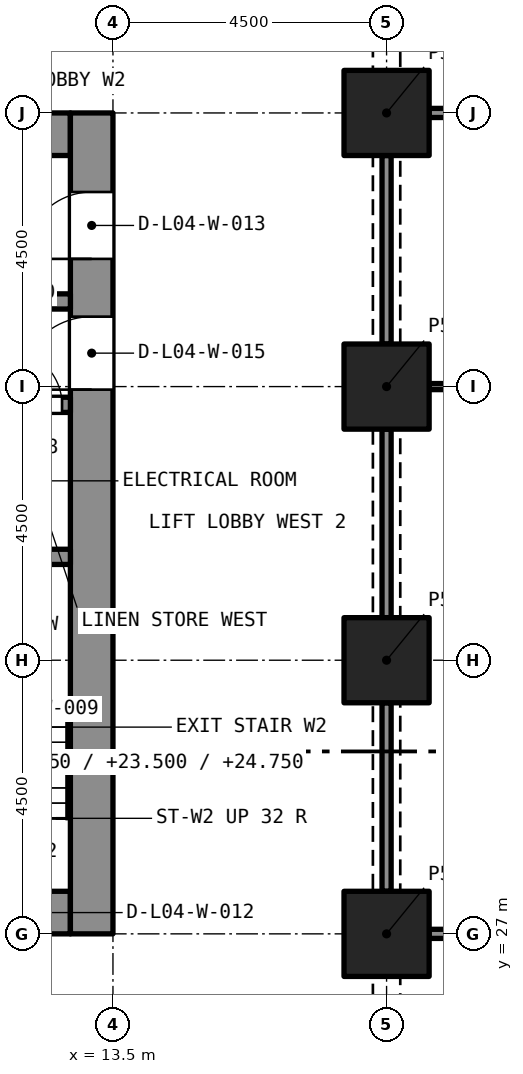
"""IFC4 building model, lengths in metres.
Left out: names, types, materials, properties, quantities, classifications, styles, units other than length and angle.
Written with IfcOpenShell. Run it as: python <this file> out.ifc"""

import sys

from ifc_helpers import new_model, si_unit, direction, frame, frame_2d, origin, origin_2d, place, context, subcontext, project, spatial, rectangle, extrude, element, fill, save


model = new_model("IFC4")
c1 = context("Model", 3, precision=1e-05, world=origin(), true_north=direction((0.0, 1.0)))
c2 = subcontext(c1, "Body", "Model", "MODEL_VIEW")
j1 = project(units=[si_unit("LENGTHUNIT", "METRE"), si_unit("PLANEANGLEUNIT", "RADIAN")], contexts=[c1])
p1 = place(None, origin())
s1 = spatial("IfcSite", under=j1, at=p1, CompositionType="ELEMENT")
p2 = place(p1, origin())
s2 = spatial("IfcBuilding", under=s1, at=p2, CompositionType="ELEMENT")
p3 = place(p2, frame((0.0, 0.0, 21.0)))
s3 = spatial("IfcBuildingStorey", under=s2, at=p3, CompositionType="ELEMENT", Elevation=21.0)
for number, where, z_axis, x_axis in (
    (1, (18.0, 27.0, 0.0), (0.0, 0.0, 1.0), (1.0, 0.0, 0.0)),
    (2, (18.0, 31.5, 0.0), (0.0, 0.0, 1.0), (1.0, 0.0, 0.0)),
    (3, (18.0, 36.0, 0.0), (0.0, 0.0, 1.0), (1.0, 0.0, 0.0)),
    (4, (18.0, 40.5, 0.0), (0.0, 0.0, 1.0), (1.0, 0.0, 0.0)),
):
    element("IfcColumn", number, at=place(p3, frame(where, z_axis=z_axis, x_axis=x_axis)), inside=s3, PredefinedType="COLUMN", context=c2, shape_type="SweptSolid", body=[
        extrude(rectangle(XDim=1.4, YDim=1.4, at=origin_2d()), origin(), (0.0, 0.0, 1.0), 5.0),
    ])
p4 = place(p3, frame((5.2, 27.35, 0.0), z_axis=(0.0, 0.0, 1.0), x_axis=(1.0, 0.0, 0.0)))
e5 = element("IfcWall", 5, at=p4, inside=s3, PredefinedType="SOLIDWALL", context=c2, shape_type="SweptSolid", body=[
    extrude(rectangle(XDim=7.6, YDim=0.7, at=frame_2d((3.8, 0.0))), origin(), (0.0, 0.0, 1.0), 5.0),
])
p5 = place(p4, frame((0.725, 0.0, 0.0)))
e6 = element("IfcOpeningElement", 6, at=p5, cuts=e5, PredefinedType="OPENING", context=c2, shape_type="SweptSolid", body=[
    extrude(rectangle(XDim=1.1, YDim=2.1, at=frame_2d((0.55, 1.05))), frame((0.0, 0.36, 0.0), z_axis=(0.0, -1.0, 0.0), x_axis=(1.0, 0.0, 0.0)), (0.0, 0.0, 1.0), 0.72),
])
p6 = place(p4, frame((3.25, 0.0, 0.0)))
e7 = element("IfcOpeningElement", 7, at=p6, cuts=e5, PredefinedType="OPENING", context=c2, shape_type="SweptSolid", body=[
    extrude(rectangle(XDim=1.1, YDim=2.1, at=frame_2d((0.55, 1.05))), frame((0.0, 0.36, 0.0), z_axis=(0.0, -1.0, 0.0), x_axis=(1.0, 0.0, 0.0)), (0.0, 0.0, 1.0), 0.72),
])
p7 = place(p4, frame((5.775, 0.0, 0.0)))
e8 = element("IfcOpeningElement", 8, at=p7, cuts=e5, PredefinedType="OPENING", context=c2, shape_type="SweptSolid", body=[
    extrude(rectangle(XDim=1.1, YDim=2.1, at=frame_2d((0.55, 1.05))), frame((0.0, 0.36, 0.0), z_axis=(0.0, -1.0, 0.0), x_axis=(1.0, 0.0, 0.0)), (0.0, 0.0, 1.0), 0.72),
])
p8 = place(p3, frame((5.2, 40.15, 0.0), z_axis=(0.0, 0.0, 1.0), x_axis=(1.0, 0.0, 0.0)))
e9 = element("IfcWall", 9, at=p8, inside=s3, PredefinedType="SOLIDWALL", context=c2, shape_type="SweptSolid", body=[
    extrude(rectangle(XDim=7.6, YDim=0.7, at=frame_2d((3.8, 0.0))), origin(), (0.0, 0.0, 1.0), 5.0),
])
p9 = place(p3, frame((13.15, 27.0, 0.0), z_axis=(0.0, 0.0, 1.0), x_axis=(0.0, 1.0, 0.0)))
e10 = element("IfcWall", 10, at=p9, inside=s3, PredefinedType="SOLIDWALL", context=c2, shape_type="SweptSolid", body=[
    extrude(rectangle(XDim=13.5, YDim=0.7, at=frame_2d((6.75, 0.0))), origin(), (0.0, 0.0, 1.0), 5.0),
])
p10 = place(p9, frame((11.1, 0.0, 0.0)))
e11 = element("IfcOpeningElement", 11, at=p10, cuts=e10, PredefinedType="OPENING", context=c2, shape_type="SweptSolid", body=[
    extrude(rectangle(XDim=1.1, YDim=2.1, at=frame_2d((0.55, 1.05))), frame((0.0, 0.36, 0.0), z_axis=(0.0, -1.0, 0.0), x_axis=(1.0, 0.0, 0.0)), (0.0, 0.0, 1.0), 0.72),
])
p11 = place(p9, frame((8.95, 0.0, 0.0)))
e12 = element("IfcOpeningElement", 12, at=p11, cuts=e10, PredefinedType="OPENING", context=c2, shape_type="SweptSolid", body=[
    extrude(rectangle(XDim=1.2, YDim=2.1, at=frame_2d((0.6, 1.05))), frame((0.0, 0.36, 0.0), z_axis=(0.0, -1.0, 0.0), x_axis=(1.0, 0.0, 0.0)), (0.0, 0.0, 1.0), 0.72),
])
p12 = place(p3, frame((5.2, 33.2, 0.0), z_axis=(0.0, 0.0, 1.0), x_axis=(1.0, 0.0, 0.0)))
e13 = element("IfcWall", 13, at=p12, inside=s3, PredefinedType="SOLIDWALL", context=c2, shape_type="SweptSolid", body=[
    extrude(rectangle(XDim=7.6, YDim=0.25, at=frame_2d((3.8, 0.0))), origin(), (0.0, 0.0, 1.0), 4.65),
])
p13 = place(p12, frame((3.3, 0.0, 0.0)))
e14 = element("IfcOpeningElement", 14, at=p13, cuts=e13, PredefinedType="OPENING", context=c2, shape_type="SweptSolid", body=[
    extrude(rectangle(XDim=1.0, YDim=2.1, at=frame_2d((0.5, 1.05))), frame((0.0, 0.135, 0.0), z_axis=(0.0, -1.0, 0.0), x_axis=(1.0, 0.0, 0.0)), (0.0, 0.0, 1.0), 0.27),
])
p14 = place(p3, frame((5.2, 35.7, 0.0), z_axis=(0.0, 0.0, 1.0), x_axis=(1.0, 0.0, 0.0)))
e15 = element("IfcWall", 15, at=p14, inside=s3, PredefinedType="SOLIDWALL", context=c2, shape_type="SweptSolid", body=[
    extrude(rectangle(XDim=7.6, YDim=0.25, at=frame_2d((3.8, 0.0))), origin(), (0.0, 0.0, 1.0), 4.65),
])
p15 = place(p14, frame((0.137, 0.0, 0.0)))
e16 = element("IfcOpeningElement", 16, at=p15, cuts=e15, PredefinedType="OPENING", context=c2, shape_type="SweptSolid", body=[
    extrude(rectangle(XDim=0.9, YDim=2.1, at=frame_2d((0.45, 1.05))), frame((0.0, 0.135, 0.0), z_axis=(0.0, -1.0, 0.0), x_axis=(1.0, 0.0, 0.0)), (0.0, 0.0, 1.0), 0.27),
])
p16 = place(p14, frame((1.512, 0.0, 0.0)))
e17 = element("IfcOpeningElement", 17, at=p16, cuts=e15, PredefinedType="OPENING", context=c2, shape_type="SweptSolid", body=[
    extrude(rectangle(XDim=0.9, YDim=2.1, at=frame_2d((0.45, 1.05))), frame((0.0, 0.135, 0.0), z_axis=(0.0, -1.0, 0.0), x_axis=(1.0, 0.0, 0.0)), (0.0, 0.0, 1.0), 0.27),
])
p17 = place(p14, frame((5.188, 0.0, 0.0)))
e18 = element("IfcOpeningElement", 18, at=p17, cuts=e15, PredefinedType="OPENING", context=c2, shape_type="SweptSolid", body=[
    extrude(rectangle(XDim=0.9, YDim=2.1, at=frame_2d((0.45, 1.05))), frame((0.0, 0.135, 0.0), z_axis=(0.0, -1.0, 0.0), x_axis=(1.0, 0.0, 0.0)), (0.0, 0.0, 1.0), 0.27),
])
p18 = place(p14, frame((6.562, 0.0, 0.0)))
e19 = element("IfcOpeningElement", 19, at=p18, cuts=e15, PredefinedType="OPENING", context=c2, shape_type="SweptSolid", body=[
    extrude(rectangle(XDim=0.9, YDim=2.1, at=frame_2d((0.45, 1.05))), frame((0.0, 0.135, 0.0), z_axis=(0.0, -1.0, 0.0), x_axis=(1.0, 0.0, 0.0)), (0.0, 0.0, 1.0), 0.27),
])
p19 = place(p3, frame((5.2, 37.4, 0.0), z_axis=(0.0, 0.0, 1.0), x_axis=(1.0, 0.0, 0.0)))
e20 = element("IfcWall", 20, at=p19, inside=s3, PredefinedType="SOLIDWALL", context=c2, shape_type="SweptSolid", body=[
    extrude(rectangle(XDim=7.6, YDim=0.25, at=frame_2d((3.8, 0.0))), origin(), (0.0, 0.0, 1.0), 4.65),
])
p20 = place(p19, frame((0.7, 0.0, 0.0)))
e21 = element("IfcOpeningElement", 21, at=p20, cuts=e20, PredefinedType="OPENING", context=c2, shape_type="SweptSolid", body=[
    extrude(rectangle(XDim=1.1, YDim=2.4, at=frame_2d((0.55, 1.2))), frame((0.0, 0.135, 0.0), z_axis=(0.0, -1.0, 0.0), x_axis=(1.0, 0.0, 0.0)), (0.0, 0.0, 1.0), 0.27),
])
p21 = place(p3, frame((18.7, 27.0, 0.0), z_axis=(0.0, 0.0, 1.0), x_axis=(1.0, 0.0, 0.0)))
e22 = element("IfcWall", 22, at=p21, inside=s3, PredefinedType="PARTITIONING", context=c2, shape_type="SweptSolid", body=[
    extrude(rectangle(XDim=12.1, YDim=0.15, at=frame_2d((6.05, 0.0))), origin(), (0.0, 0.0, 1.0), 4.55),
])
p22 = place(p21, frame((5.45, 0.0, 0.0)))
e23 = element("IfcOpeningElement", 23, at=p22, cuts=e22, PredefinedType="OPENING", context=c2, shape_type="SweptSolid", body=[
    extrude(rectangle(XDim=1.2, YDim=2.1, at=frame_2d((0.6, 1.05))), frame((0.0, 0.085, 0.0), z_axis=(0.0, -1.0, 0.0), x_axis=(1.0, 0.0, 0.0)), (0.0, 0.0, 1.0), 0.17),
])
p23 = place(p3, frame((18.7, 36.0, 0.0), z_axis=(0.0, 0.0, 1.0), x_axis=(1.0, 0.0, 0.0)))
e24 = element("IfcWall", 24, at=p23, inside=s3, PredefinedType="PARTITIONING", context=c2, shape_type="SweptSolid", body=[
    extrude(rectangle(XDim=12.1, YDim=0.1, at=frame_2d((6.05, 0.0))), origin(), (0.0, 0.0, 1.0), 4.55),
])
for number, where, z_axis, x_axis in (
    (25, (18.0, 27.7, 0.0), (0.0, 0.0, 1.0), (0.0, 1.0, 0.0)),
    (26, (18.0, 32.2, 0.0), (0.0, 0.0, 1.0), (0.0, 1.0, 0.0)),
):
    element("IfcWall", number, at=place(p3, frame(where, z_axis=z_axis, x_axis=x_axis)), inside=s3, PredefinedType="PARTITIONING", context=c2, shape_type="SweptSolid", body=[
        extrude(rectangle(XDim=3.1, YDim=0.15, at=frame_2d((1.55, 0.0))), origin(), (0.0, 0.0, 1.0), 4.18),
    ])
p24 = place(p3, frame((30.8, 40.5, 0.0), z_axis=(0.0, 0.0, 1.0), x_axis=(-1.0, 0.0, 0.0)))
e27 = element("IfcWall", 27, at=p24, inside=s3, PredefinedType="PARTITIONING", context=c2, shape_type="SweptSolid", body=[
    extrude(rectangle(XDim=12.1, YDim=0.15, at=frame_2d((6.05, 0.0))), origin(), (0.0, 0.0, 1.0), 4.55),
])
p25 = place(p24, frame((5.45, 0.0, 0.0)))
e28 = element("IfcOpeningElement", 28, at=p25, cuts=e27, PredefinedType="OPENING", context=c2, shape_type="SweptSolid", body=[
    extrude(rectangle(XDim=1.2, YDim=2.1, at=frame_2d((0.6, 1.05))), frame((0.0, 0.085, 0.0), z_axis=(0.0, -1.0, 0.0), x_axis=(1.0, 0.0, 0.0)), (0.0, 0.0, 1.0), 0.17),
])
p26 = place(p3, frame((18.0, 36.7, 0.0), z_axis=(0.0, 0.0, 1.0), x_axis=(0.0, 1.0, 0.0)))
e29 = element("IfcWall", 29, at=p26, inside=s3, PredefinedType="PARTITIONING", context=c2, shape_type="SweptSolid", body=[
    extrude(rectangle(XDim=3.1, YDim=0.15, at=frame_2d((1.55, 0.0))), origin(), (0.0, 0.0, 1.0), 4.18),
])
p27 = place(p18, origin())
e30 = element("IfcDoor", 30, at=p27, inside=s3, OperationType="SINGLE_SWING_LEFT", PredefinedType="DOOR", context=c2, shape_type="SweptSolid", body=[
    extrude(rectangle(XDim=0.9, YDim=2.1, at=frame_2d((0.45, 1.05))), frame((0.0, 0.025, 0.0), z_axis=(0.0, -1.0, 0.0), x_axis=(1.0, 0.0, 0.0)), (0.0, 0.0, 1.0), 0.05),
])
fill(e19, e30)
p28 = place(p10, origin())
e31 = element("IfcDoor", 31, at=p28, inside=s3, OperationType="SINGLE_SWING_LEFT", PredefinedType="DOOR", context=c2, shape_type="SweptSolid", body=[
    extrude(rectangle(XDim=1.1, YDim=2.1, at=frame_2d((0.55, 1.05))), frame((0.0, 0.025, 0.0), z_axis=(0.0, -1.0, 0.0), x_axis=(1.0, 0.0, 0.0)), (0.0, 0.0, 1.0), 0.05),
])
fill(e11, e31)
p29 = place(p11, origin())
e32 = element("IfcDoor", 32, at=p29, inside=s3, OperationType="SINGLE_SWING_LEFT", PredefinedType="DOOR", context=c2, shape_type="SweptSolid", body=[
    extrude(rectangle(XDim=1.2, YDim=2.1, at=frame_2d((0.6, 1.05))), frame((0.0, 0.025, 0.0), z_axis=(0.0, -1.0, 0.0), x_axis=(1.0, 0.0, 0.0)), (0.0, 0.0, 1.0), 0.05),
])
fill(e12, e32)
save(model, sys.argv[1])
